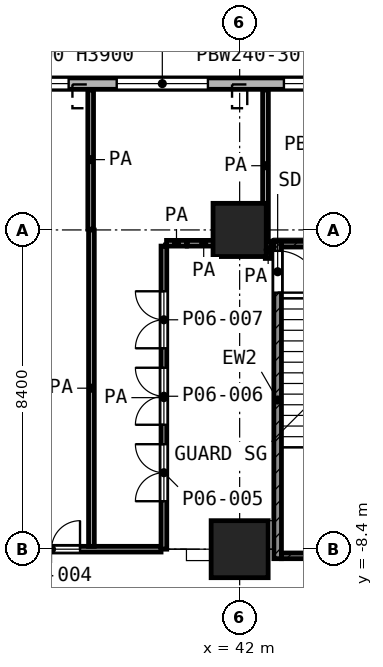
"""IFC4 building model, lengths in metres.
Left out: names, types, materials, properties, quantities, classifications, styles, units other than length and angle.
Written with IfcOpenShell. Run it as: python <this file> out.ifc"""

import sys

from ifc_helpers import new_model, si_unit, direction, frame, frame_2d, origin, origin_2d, place, context, subcontext, project, spatial, rectangle, extrude, element, fill, save


model = new_model("IFC4")
c1 = context("Model", 3, precision=1e-05, world=origin(), true_north=direction((0.0, 1.0)))
c2 = subcontext(c1, "Body", "Model", "MODEL_VIEW")
j1 = project(units=[si_unit("LENGTHUNIT", "METRE"), si_unit("PLANEANGLEUNIT", "RADIAN")], contexts=[c1])
p1 = place(None, origin())
s1 = spatial("IfcSite", under=j1, at=p1, CompositionType="ELEMENT")
p2 = place(p1, origin())
s2 = spatial("IfcBuilding", under=s1, at=p2, CompositionType="ELEMENT")
p3 = place(p2, frame((0.0, 0.0, 29.0)))
s3 = spatial("IfcBuildingStorey", under=s2, at=p3, CompositionType="ELEMENT", Elevation=29.0)
p4 = place(p3, frame((42.0, 0.0, 0.0), z_axis=(0.0, 0.0, 1.0), x_axis=(1.0, 0.0, 0.0)))
e1 = element("IfcColumn", 1, at=p4, inside=s3, PredefinedType="COLUMN", context=c2, shape_type="SweptSolid", body=[
    extrude(rectangle(XDim=1.4, YDim=1.4, at=origin_2d()), origin(), (0.0, 0.0, 1.0), 5.2),
])
p5 = place(p3, frame((42.0, -8.4, 0.0), z_axis=(0.0, 0.0, 1.0), x_axis=(1.0, 0.0, 0.0)))
e2 = element("IfcColumn", 2, at=p5, inside=s3, PredefinedType="COLUMN", context=c2, shape_type="SweptSolid", body=[
    extrude(rectangle(XDim=1.5, YDim=1.5, at=origin_2d()), origin(), (0.0, 0.0, 1.0), 5.2),
])
p6 = place(p3, frame((90.338, 3.85, 0.0), z_axis=(0.0, 0.0, 1.0), x_axis=(-1.0, 0.0, 0.0)))
e3 = element("IfcWall", 3, at=p6, inside=s3, PredefinedType="SOLIDWALL", context=c2, shape_type="SweptSolid", body=[
    extrude(rectangle(XDim=88.276, YDim=0.3, at=frame_2d((44.138, 0.0))), origin(), (0.0, 0.0, 1.0), 4.7),
])
p7 = place(p6, frame((0.438, 0.0, 0.9)))
e4 = element("IfcOpeningElement", 4, at=p7, cuts=e3, PredefinedType="OPENING", context=c2, shape_type="SweptSolid", body=[
    extrude(rectangle(XDim=1.2, YDim=3.0, at=frame_2d((0.6, 1.5))), frame((0.0, 0.16, 0.0), z_axis=(0.0, -1.0, 0.0), x_axis=(1.0, 0.0, 0.0)), (0.0, 0.0, 1.0), 0.32),
])
p8 = place(p6, frame((2.438, 0.0, 0.9)))
e5 = element("IfcOpeningElement", 5, at=p8, cuts=e3, PredefinedType="OPENING", context=c2, shape_type="SweptSolid", body=[
    extrude(rectangle(XDim=3.6, YDim=3.0, at=frame_2d((1.8, 1.5))), frame((0.0, 0.16, 0.0), z_axis=(0.0, -1.0, 0.0), x_axis=(1.0, 0.0, 0.0)), (0.0, 0.0, 1.0), 0.32),
])
p9 = place(p6, frame((6.638, 0.0, 0.9)))
e6 = element("IfcOpeningElement", 6, at=p9, cuts=e3, PredefinedType="OPENING", context=c2, shape_type="SweptSolid", body=[
    extrude(rectangle(XDim=3.6, YDim=3.0, at=frame_2d((1.8, 1.5))), frame((0.0, 0.16, 0.0), z_axis=(0.0, -1.0, 0.0), x_axis=(1.0, 0.0, 0.0)), (0.0, 0.0, 1.0), 0.32),
])
p10 = place(p6, frame((10.838, 0.0, 0.9)))
e7 = element("IfcOpeningElement", 7, at=p10, cuts=e3, PredefinedType="OPENING", context=c2, shape_type="SweptSolid", body=[
    extrude(rectangle(XDim=3.6, YDim=3.0, at=frame_2d((1.8, 1.5))), frame((0.0, 0.16, 0.0), z_axis=(0.0, -1.0, 0.0), x_axis=(1.0, 0.0, 0.0)), (0.0, 0.0, 1.0), 0.32),
])
p11 = place(p6, frame((15.038, 0.0, 0.9)))
e8 = element("IfcOpeningElement", 8, at=p11, cuts=e3, PredefinedType="OPENING", context=c2, shape_type="SweptSolid", body=[
    extrude(rectangle(XDim=3.6, YDim=3.0, at=frame_2d((1.8, 1.5))), frame((0.0, 0.16, 0.0), z_axis=(0.0, -1.0, 0.0), x_axis=(1.0, 0.0, 0.0)), (0.0, 0.0, 1.0), 0.32),
])
p12 = place(p6, frame((19.923, 0.0, 0.9)))
e9 = element("IfcOpeningElement", 9, at=p12, cuts=e3, PredefinedType="OPENING", context=c2, shape_type="SweptSolid", body=[
    extrude(rectangle(XDim=2.4, YDim=3.0, at=frame_2d((1.2, 1.5))), frame((0.0, 0.16, 0.0), z_axis=(0.0, -1.0, 0.0), x_axis=(1.0, 0.0, 0.0)), (0.0, 0.0, 1.0), 0.32),
])
p13 = place(p6, frame((23.438, 0.0, 0.9)))
e10 = element("IfcOpeningElement", 10, at=p13, cuts=e3, PredefinedType="OPENING", context=c2, shape_type="SweptSolid", body=[
    extrude(rectangle(XDim=3.6, YDim=3.0, at=frame_2d((1.8, 1.5))), frame((0.0, 0.16, 0.0), z_axis=(0.0, -1.0, 0.0), x_axis=(1.0, 0.0, 0.0)), (0.0, 0.0, 1.0), 0.32),
])
p14 = place(p6, frame((27.638, 0.0, 0.9)))
e11 = element("IfcOpeningElement", 11, at=p14, cuts=e3, PredefinedType="OPENING", context=c2, shape_type="SweptSolid", body=[
    extrude(rectangle(XDim=3.6, YDim=3.0, at=frame_2d((1.8, 1.5))), frame((0.0, 0.16, 0.0), z_axis=(0.0, -1.0, 0.0), x_axis=(1.0, 0.0, 0.0)), (0.0, 0.0, 1.0), 0.32),
])
p15 = place(p6, frame((31.838, 0.0, 0.9)))
e12 = element("IfcOpeningElement", 12, at=p15, cuts=e3, PredefinedType="OPENING", context=c2, shape_type="SweptSolid", body=[
    extrude(rectangle(XDim=3.6, YDim=3.0, at=frame_2d((1.8, 1.5))), frame((0.0, 0.16, 0.0), z_axis=(0.0, -1.0, 0.0), x_axis=(1.0, 0.0, 0.0)), (0.0, 0.0, 1.0), 0.32),
])
p16 = place(p6, frame((36.038, 0.0, 0.9)))
e13 = element("IfcOpeningElement", 13, at=p16, cuts=e3, PredefinedType="OPENING", context=c2, shape_type="SweptSolid", body=[
    extrude(rectangle(XDim=3.6, YDim=3.0, at=frame_2d((1.8, 1.5))), frame((0.0, 0.16, 0.0), z_axis=(0.0, -1.0, 0.0), x_axis=(1.0, 0.0, 0.0)), (0.0, 0.0, 1.0), 0.32),
])
p17 = place(p6, frame((40.238, 0.0, 0.9)))
e14 = element("IfcOpeningElement", 14, at=p17, cuts=e3, PredefinedType="OPENING", context=c2, shape_type="SweptSolid", body=[
    extrude(rectangle(XDim=3.6, YDim=3.0, at=frame_2d((1.8, 1.5))), frame((0.0, 0.16, 0.0), z_axis=(0.0, -1.0, 0.0), x_axis=(1.0, 0.0, 0.0)), (0.0, 0.0, 1.0), 0.32),
])
p18 = place(p6, frame((44.773, 0.0, 0.9)))
e15 = element("IfcOpeningElement", 15, at=p18, cuts=e3, PredefinedType="OPENING", context=c2, shape_type="SweptSolid", body=[
    extrude(rectangle(XDim=2.4, YDim=3.0, at=frame_2d((1.2, 1.5))), frame((0.0, 0.16, 0.0), z_axis=(0.0, -1.0, 0.0), x_axis=(1.0, 0.0, 0.0)), (0.0, 0.0, 1.0), 0.32),
])
p19 = place(p6, frame((49.173, 0.0, 0.9)))
e16 = element("IfcOpeningElement", 16, at=p19, cuts=e3, PredefinedType="OPENING", context=c2, shape_type="SweptSolid", body=[
    extrude(rectangle(XDim=2.4, YDim=3.0, at=frame_2d((1.2, 1.5))), frame((0.0, 0.16, 0.0), z_axis=(0.0, -1.0, 0.0), x_axis=(1.0, 0.0, 0.0)), (0.0, 0.0, 1.0), 0.32),
])
p20 = place(p6, frame((52.838, 0.0, 0.9)))
e17 = element("IfcOpeningElement", 17, at=p20, cuts=e3, PredefinedType="OPENING", context=c2, shape_type="SweptSolid", body=[
    extrude(rectangle(XDim=3.6, YDim=3.0, at=frame_2d((1.8, 1.5))), frame((0.0, 0.16, 0.0), z_axis=(0.0, -1.0, 0.0), x_axis=(1.0, 0.0, 0.0)), (0.0, 0.0, 1.0), 0.32),
])
p21 = place(p6, frame((57.038, 0.0, 0.9)))
e18 = element("IfcOpeningElement", 18, at=p21, cuts=e3, PredefinedType="OPENING", context=c2, shape_type="SweptSolid", body=[
    extrude(rectangle(XDim=3.6, YDim=3.0, at=frame_2d((1.8, 1.5))), frame((0.0, 0.16, 0.0), z_axis=(0.0, -1.0, 0.0), x_axis=(1.0, 0.0, 0.0)), (0.0, 0.0, 1.0), 0.32),
])
p22 = place(p6, frame((61.923, 0.0, 0.9)))
e19 = element("IfcOpeningElement", 19, at=p22, cuts=e3, PredefinedType="OPENING", context=c2, shape_type="SweptSolid", body=[
    extrude(rectangle(XDim=2.4, YDim=3.0, at=frame_2d((1.2, 1.5))), frame((0.0, 0.16, 0.0), z_axis=(0.0, -1.0, 0.0), x_axis=(1.0, 0.0, 0.0)), (0.0, 0.0, 1.0), 0.32),
])
p23 = place(p6, frame((65.438, 0.0, 0.9)))
e20 = element("IfcOpeningElement", 20, at=p23, cuts=e3, PredefinedType="OPENING", context=c2, shape_type="SweptSolid", body=[
    extrude(rectangle(XDim=3.6, YDim=3.0, at=frame_2d((1.8, 1.5))), frame((0.0, 0.16, 0.0), z_axis=(0.0, -1.0, 0.0), x_axis=(1.0, 0.0, 0.0)), (0.0, 0.0, 1.0), 0.32),
])
p24 = place(p6, frame((69.638, 0.0, 0.9)))
e21 = element("IfcOpeningElement", 21, at=p24, cuts=e3, PredefinedType="OPENING", context=c2, shape_type="SweptSolid", body=[
    extrude(rectangle(XDim=3.6, YDim=3.0, at=frame_2d((1.8, 1.5))), frame((0.0, 0.16, 0.0), z_axis=(0.0, -1.0, 0.0), x_axis=(1.0, 0.0, 0.0)), (0.0, 0.0, 1.0), 0.32),
])
p25 = place(p6, frame((73.838, 0.0, 0.9)))
e22 = element("IfcOpeningElement", 22, at=p25, cuts=e3, PredefinedType="OPENING", context=c2, shape_type="SweptSolid", body=[
    extrude(rectangle(XDim=3.6, YDim=3.0, at=frame_2d((1.8, 1.5))), frame((0.0, 0.16, 0.0), z_axis=(0.0, -1.0, 0.0), x_axis=(1.0, 0.0, 0.0)), (0.0, 0.0, 1.0), 0.32),
])
p26 = place(p6, frame((78.038, 0.0, 0.9)))
e23 = element("IfcOpeningElement", 23, at=p26, cuts=e3, PredefinedType="OPENING", context=c2, shape_type="SweptSolid", body=[
    extrude(rectangle(XDim=3.6, YDim=3.0, at=frame_2d((1.8, 1.5))), frame((0.0, 0.16, 0.0), z_axis=(0.0, -1.0, 0.0), x_axis=(1.0, 0.0, 0.0)), (0.0, 0.0, 1.0), 0.32),
])
p27 = place(p6, frame((82.238, 0.0, 0.9)))
e24 = element("IfcOpeningElement", 24, at=p27, cuts=e3, PredefinedType="OPENING", context=c2, shape_type="SweptSolid", body=[
    extrude(rectangle(XDim=3.6, YDim=3.0, at=frame_2d((1.8, 1.5))), frame((0.0, 0.16, 0.0), z_axis=(0.0, -1.0, 0.0), x_axis=(1.0, 0.0, 0.0)), (0.0, 0.0, 1.0), 0.32),
])
p28 = place(p6, frame((86.638, 0.0, 0.9)))
e25 = element("IfcOpeningElement", 25, at=p28, cuts=e3, PredefinedType="OPENING", context=c2, shape_type="SweptSolid", body=[
    extrude(rectangle(XDim=1.2, YDim=3.0, at=frame_2d((0.6, 1.5))), frame((0.0, 0.16, 0.0), z_axis=(0.0, -1.0, 0.0), x_axis=(1.0, 0.0, 0.0)), (0.0, 0.0, 1.0), 0.32),
])
p29 = place(p3, frame((43.0, -8.65, 0.0), z_axis=(0.0, 0.0, 1.0), x_axis=(0.0, 1.0, 0.0)))
e26 = element("IfcWall", 26, at=p29, inside=s3, PredefinedType="SHEAR", context=c2, shape_type="SweptSolid", body=[
    extrude(rectangle(XDim=8.35, YDim=0.2, at=frame_2d((4.175, 0.0))), origin(), (0.0, 0.0, 1.0), 4.7),
])
p30 = place(p29, frame((7.0, 0.0, 0.0)))
e27 = element("IfcOpeningElement", 27, at=p30, cuts=e26, PredefinedType="OPENING", context=c2, shape_type="SweptSolid", body=[
    extrude(rectangle(XDim=1.1, YDim=2.1, at=frame_2d((0.55, 1.05))), frame((0.0, 0.11, 0.0), z_axis=(0.0, -1.0, 0.0), x_axis=(1.0, 0.0, 0.0)), (0.0, 0.0, 1.0), 0.22),
])
for number, where, z_axis, x_axis in (
    (28, (43.1, -0.375, 0.0), (0.0, 0.0, 1.0), (1.0, 0.0, 0.0)),
    (29, (43.1, -8.575, 0.0), (0.0, 0.0, 1.0), (1.0, 0.0, 0.0)),
):
    element("IfcWall", number, at=place(p3, frame(where, z_axis=z_axis, x_axis=x_axis)), inside=s3, PredefinedType="SHEAR", context=c2, shape_type="SweptSolid", body=[
        extrude(rectangle(XDim=2.85, YDim=0.15, at=frame_2d((1.425, 0.0))), origin(), (0.0, 0.0, 1.0), 4.7),
    ])
p31 = place(p3, frame((25.2, -8.4, 0.0), z_axis=(0.0, 0.0, 1.0), x_axis=(1.0, 0.0, 0.0)))
e30 = element("IfcWall", 30, at=p31, inside=s3, PredefinedType="PARTITIONING", context=c2, shape_type="SweptSolid", body=[
    extrude(rectangle(XDim=14.732, YDim=0.15, at=frame_2d((7.366, 0.0))), origin(), (0.0, 0.0, 1.0), 4.7),
])
p32 = place(p31, frame((1.35, 0.0, 0.0)))
e31 = element("IfcOpeningElement", 31, at=p32, cuts=e30, PredefinedType="OPENING", context=c2, shape_type="SweptSolid", body=[
    extrude(rectangle(XDim=1.2, YDim=2.1, at=frame_2d((0.6, 1.05))), frame((0.0, 0.085, 0.0), z_axis=(0.0, -1.0, 0.0), x_axis=(1.0, 0.0, 0.0)), (0.0, 0.0, 1.0), 0.17),
])
p33 = place(p31, frame((5.4, 0.0, 0.0)))
e32 = element("IfcOpeningElement", 32, at=p33, cuts=e30, PredefinedType="OPENING", context=c2, shape_type="SweptSolid", body=[
    extrude(rectangle(XDim=1.5, YDim=2.1, at=frame_2d((0.75, 1.05))), frame((0.0, 0.085, 0.0), z_axis=(0.0, -1.0, 0.0), x_axis=(1.0, 0.0, 0.0)), (0.0, 0.0, 1.0), 0.17),
])
p34 = place(p31, frame((9.25, 0.0, 0.0)))
e33 = element("IfcOpeningElement", 33, at=p34, cuts=e30, PredefinedType="OPENING", context=c2, shape_type="SweptSolid", body=[
    extrude(rectangle(XDim=1.5, YDim=2.1, at=frame_2d((0.75, 1.05))), frame((0.0, 0.085, 0.0), z_axis=(0.0, -1.0, 0.0), x_axis=(1.0, 0.0, 0.0)), (0.0, 0.0, 1.0), 0.17),
])
p35 = place(p31, frame((11.1, 0.0, 0.0)))
e34 = element("IfcOpeningElement", 34, at=p35, cuts=e30, PredefinedType="OPENING", context=c2, shape_type="SweptSolid", body=[
    extrude(rectangle(XDim=1.5, YDim=2.1, at=frame_2d((0.75, 1.05))), frame((0.0, 0.085, 0.0), z_axis=(0.0, -1.0, 0.0), x_axis=(1.0, 0.0, 0.0)), (0.0, 0.0, 1.0), 0.17),
])
p36 = place(p3, frame((40.076, -0.35, 0.0), z_axis=(0.0, 0.0, 1.0), x_axis=(1.0, 0.0, 0.0)))
e35 = element("IfcWall", 35, at=p36, inside=s3, PredefinedType="PARTITIONING", context=c2, shape_type="SweptSolid", body=[
    extrude(rectangle(XDim=0.524, YDim=0.15, at=frame_2d((0.262, 0.0))), origin(), (0.0, 0.0, 1.0), 4.7),
])
p37 = place(p3, frame((40.62, -0.35, 0.0), z_axis=(0.0, 0.0, 1.0), x_axis=(1.0, 0.0, 0.0)))
e36 = element("IfcWall", 36, at=p37, inside=s3, PredefinedType="PARTITIONING", context=c2, shape_type="SweptSolid", body=[
    extrude(rectangle(XDim=0.868, YDim=0.15, at=frame_2d((0.434, 0.0))), origin(), (0.0, 0.0, 1.0), 4.7),
])
p38 = place(p3, frame((38.08, 0.02, 0.0), z_axis=(0.0, 0.0, 1.0), x_axis=(0.0, 1.0, 0.0)))
e37 = element("IfcWall", 37, at=p38, inside=s3, PredefinedType="PARTITIONING", context=c2, shape_type="SweptSolid", body=[
    extrude(rectangle(XDim=3.66, YDim=0.15, at=frame_2d((1.83, 0.0))), origin(), (0.0, 0.0, 1.0), 4.7),
])
p39 = place(p3, frame((38.1, -8.325, 0.0), z_axis=(0.0, 0.0, 1.0), x_axis=(0.0, 1.0, 0.0)))
e38 = element("IfcWall", 38, at=p39, inside=s3, PredefinedType="PARTITIONING", context=c2, shape_type="SweptSolid", body=[
    extrude(rectangle(XDim=8.322, YDim=0.15, at=frame_2d((4.161, 0.0))), origin(), (0.0, 0.0, 1.0), 4.7),
])
p40 = place(p3, frame((40.007, -8.4, 0.0), z_axis=(0.0, 0.0, 1.0), x_axis=(0.0, 1.0, 0.0)))
e39 = element("IfcWall", 39, at=p40, inside=s3, PredefinedType="PARTITIONING", context=c2, shape_type="SweptSolid", body=[
    extrude(rectangle(XDim=7.975, YDim=0.15, at=frame_2d((3.987, 0.0))), origin(), (0.0, 0.0, 1.0), 4.7),
])
p41 = place(p40, frame((1.262, 0.0, 0.0)))
e40 = element("IfcOpeningElement", 40, at=p41, cuts=e39, PredefinedType="OPENING", context=c2, shape_type="SweptSolid", body=[
    extrude(rectangle(XDim=1.5, YDim=2.1, at=frame_2d((0.75, 1.05))), frame((0.0, 0.085, 0.0), z_axis=(0.0, -1.0, 0.0), x_axis=(1.0, 0.0, 0.0)), (0.0, 0.0, 1.0), 0.17),
])
p42 = place(p40, frame((3.274, 0.0, 0.0)))
e41 = element("IfcOpeningElement", 41, at=p42, cuts=e39, PredefinedType="OPENING", context=c2, shape_type="SweptSolid", body=[
    extrude(rectangle(XDim=1.5, YDim=2.1, at=frame_2d((0.75, 1.05))), frame((0.0, 0.085, 0.0), z_axis=(0.0, -1.0, 0.0), x_axis=(1.0, 0.0, 0.0)), (0.0, 0.0, 1.0), 0.17),
])
p43 = place(p40, frame((5.286, 0.0, 0.0)))
e42 = element("IfcOpeningElement", 42, at=p43, cuts=e39, PredefinedType="OPENING", context=c2, shape_type="SweptSolid", body=[
    extrude(rectangle(XDim=1.5, YDim=2.1, at=frame_2d((0.75, 1.05))), frame((0.0, 0.085, 0.0), z_axis=(0.0, -1.0, 0.0), x_axis=(1.0, 0.0, 0.0)), (0.0, 0.0, 1.0), 0.17),
])
p44 = place(p3, frame((42.68, -0.3, 0.0), z_axis=(0.0, 0.0, 1.0), x_axis=(0.0, 1.0, 0.0)))
e43 = element("IfcWall", 43, at=p44, inside=s3, PredefinedType="PARTITIONING", context=c2, shape_type="SweptSolid", body=[
    extrude(rectangle(XDim=3.98, YDim=0.15, at=frame_2d((1.99, 0.0))), origin(), (0.0, 0.0, 1.0), 4.7),
])
p45 = place(p3, frame((42.75, -0.75, 0.0), z_axis=(0.0, 0.0, 1.0), x_axis=(0.0, 1.0, 0.0)))
e44 = element("IfcWall", 44, at=p45, inside=s3, PredefinedType="PARTITIONING", context=c2, shape_type="SweptSolid", body=[
    extrude(rectangle(XDim=0.45, YDim=0.15, at=frame_2d((0.225, 0.0))), origin(), (0.0, 0.0, 1.0), 4.7),
])
p46 = place(p18, origin())
e45 = element("IfcWindow", 45, at=p46, inside=s3, PartitioningType="SINGLE_PANEL", PredefinedType="WINDOW", context=c2, shape_type="SweptSolid", body=[
    extrude(rectangle(XDim=2.4, YDim=3.0, at=frame_2d((1.2, 1.5))), frame((0.0, 0.03, 0.0), z_axis=(0.0, -1.0, 0.0), x_axis=(1.0, 0.0, 0.0)), (0.0, 0.0, 1.0), 0.06),
])
fill(e15, e45)
p47 = place(p19, origin())
e46 = element("IfcWindow", 46, at=p47, inside=s3, PartitioningType="SINGLE_PANEL", PredefinedType="WINDOW", context=c2, shape_type="SweptSolid", body=[
    extrude(rectangle(XDim=2.4, YDim=3.0, at=frame_2d((1.2, 1.5))), frame((0.0, 0.03, 0.0), z_axis=(0.0, -1.0, 0.0), x_axis=(1.0, 0.0, 0.0)), (0.0, 0.0, 1.0), 0.06),
])
fill(e16, e46)
p48 = place(p20, origin())
e47 = element("IfcWindow", 47, at=p48, inside=s3, PartitioningType="SINGLE_PANEL", PredefinedType="WINDOW", context=c2, shape_type="SweptSolid", body=[
    extrude(rectangle(XDim=3.6, YDim=3.0, at=frame_2d((1.8, 1.5))), frame((0.0, 0.03, 0.0), z_axis=(0.0, -1.0, 0.0), x_axis=(1.0, 0.0, 0.0)), (0.0, 0.0, 1.0), 0.06),
])
fill(e17, e47)
p49 = place(p30, frame((1.1, 0.0, 0.0), z_axis=(0.0, 0.0, 1.0), x_axis=(-1.0, 0.0, 0.0)))
e48 = element("IfcDoor", 48, at=p49, inside=s3, OperationType="SINGLE_SWING_LEFT", PredefinedType="DOOR", context=c2, shape_type="SweptSolid", body=[
    extrude(rectangle(XDim=1.1, YDim=2.1, at=frame_2d((0.55, 1.05))), frame((0.0, 0.025, 0.0), z_axis=(0.0, -1.0, 0.0), x_axis=(1.0, 0.0, 0.0)), (0.0, 0.0, 1.0), 0.05),
])
fill(e27, e48)
p50 = place(p35, origin())
e49 = element("IfcDoor", 49, at=p50, inside=s3, OperationType="DOUBLE_DOOR_SINGLE_SWING", PredefinedType="DOOR", context=c2, shape_type="SweptSolid", body=[
    extrude(rectangle(XDim=1.5, YDim=2.1, at=frame_2d((0.75, 1.05))), frame((0.0, 0.025, 0.0), z_axis=(0.0, -1.0, 0.0), x_axis=(1.0, 0.0, 0.0)), (0.0, 0.0, 1.0), 0.05),
])
fill(e34, e49)
p51 = place(p41, origin())
e50 = element("IfcDoor", 50, at=p51, inside=s3, OperationType="DOUBLE_DOOR_SINGLE_SWING", PredefinedType="DOOR", context=c2, shape_type="SweptSolid", body=[
    extrude(rectangle(XDim=1.5, YDim=2.1, at=frame_2d((0.75, 1.05))), frame((0.0, 0.025, 0.0), z_axis=(0.0, -1.0, 0.0), x_axis=(1.0, 0.0, 0.0)), (0.0, 0.0, 1.0), 0.05),
])
fill(e40, e50)
p52 = place(p42, origin())
e51 = element("IfcDoor", 51, at=p52, inside=s3, OperationType="DOUBLE_DOOR_SINGLE_SWING", PredefinedType="DOOR", context=c2, shape_type="SweptSolid", body=[
    extrude(rectangle(XDim=1.5, YDim=2.1, at=frame_2d((0.75, 1.05))), frame((0.0, 0.025, 0.0), z_axis=(0.0, -1.0, 0.0), x_axis=(1.0, 0.0, 0.0)), (0.0, 0.0, 1.0), 0.05),
])
fill(e41, e51)
p53 = place(p43, origin())
e52 = element("IfcDoor", 52, at=p53, inside=s3, OperationType="DOUBLE_DOOR_SINGLE_SWING", PredefinedType="DOOR", context=c2, shape_type="SweptSolid", body=[
    extrude(rectangle(XDim=1.5, YDim=2.1, at=frame_2d((0.75, 1.05))), frame((0.0, 0.025, 0.0), z_axis=(0.0, -1.0, 0.0), x_axis=(1.0, 0.0, 0.0)), (0.0, 0.0, 1.0), 0.05),
])
fill(e42, e52)
save(model, sys.argv[1])
